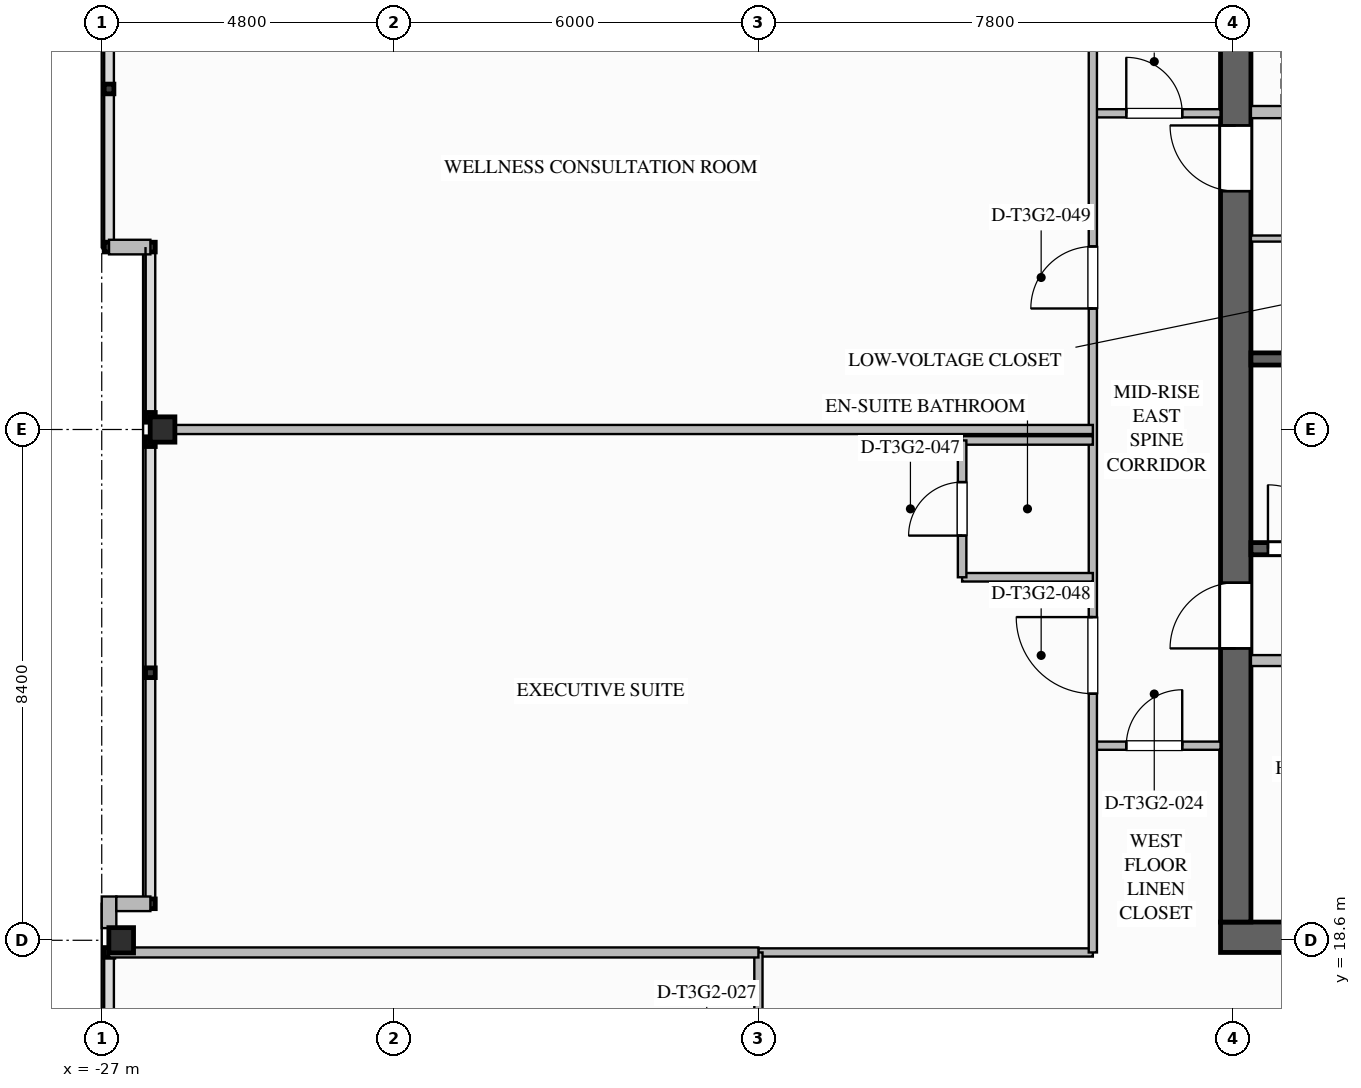
"""IFC4 building model, lengths in metres.
Left out: names, types, materials, properties, quantities, classifications, styles, units other than length and angle.
Written with IfcOpenShell. Run it as: python <this file> out.ifc"""

import sys

from ifc_helpers import new_model, si_unit, direction, frame, frame_2d, origin, origin_2d, place, context, subcontext, project, spatial, rectangle, i_section, extrude, element, fill, save


model = new_model("IFC4")
c1 = context("Model", 3, precision=1e-05, world=origin(), true_north=direction((0.0, 1.0)))
c2 = subcontext(c1, "Body", "Model", "MODEL_VIEW")
j1 = project(units=[si_unit("LENGTHUNIT", "METRE"), si_unit("PLANEANGLEUNIT", "RADIAN")], contexts=[c1])
p1 = place(None, origin())
s1 = spatial("IfcSite", under=j1, at=p1, CompositionType="ELEMENT")
p2 = place(p1, origin())
s2 = spatial("IfcBuilding", under=s1, at=p2, CompositionType="ELEMENT")
p3 = place(p2, frame((0.0, 0.0, 161.05)))
s3 = spatial("IfcBuildingStorey", under=s2, at=p3, CompositionType="ELEMENT", Elevation=161.05)
p4 = place(p3, frame((8.6, 18.65, 0.0), z_axis=(0.0, 0.0, 1.0), x_axis=(-1.0, 0.0, 0.0)))
e1 = element("IfcWall", 1, at=p4, inside=s3, PredefinedType="SHEAR", context=c2, shape_type="SweptSolid", body=[
    extrude(rectangle(XDim=17.2, YDim=0.5, at=frame_2d((8.6, 0.0))), origin(), (0.0, 0.0, 1.0), 3.55),
])
p5 = place(p3, frame((-8.35, 18.9, 0.0), z_axis=(0.0, 0.0, 1.0), x_axis=(0.0, 1.0, 0.0)))
e2 = element("IfcWall", 2, at=p5, inside=s3, PredefinedType="SHEAR", context=c2, shape_type="SweptSolid", body=[
    extrude(rectangle(XDim=16.2, YDim=0.5, at=frame_2d((8.1, 0.0))), origin(), (0.0, 0.0, 1.0), 3.55),
])
p6 = place(p5, frame((12.02, 0.0, 0.0)))
e3 = element("IfcOpeningElement", 3, at=p6, cuts=e2, PredefinedType="OPENING", context=c2, shape_type="SweptSolid", body=[
    extrude(rectangle(XDim=1.08, YDim=2.04, at=frame_2d((0.54, 1.02))), frame((0.0, 0.26, 0.0), z_axis=(0.0, -1.0, 0.0), x_axis=(1.0, 0.0, 0.0)), (0.0, 0.0, 1.0), 0.52),
])
p7 = place(p5, frame((4.5, 0.0, 0.0)))
e4 = element("IfcOpeningElement", 4, at=p7, cuts=e2, PredefinedType="OPENING", context=c2, shape_type="SweptSolid", body=[
    extrude(rectangle(XDim=1.08, YDim=2.04, at=frame_2d((0.54, 1.02))), frame((0.0, 0.26, 0.0), z_axis=(0.0, -1.0, 0.0), x_axis=(1.0, 0.0, 0.0)), (0.0, 0.0, 1.0), 0.52),
])
for number, where, z_axis, x_axis in (
    (5, (-26.68, 18.6, 0.0), (0.0, 0.0, 1.0), (1.0, 0.0, 0.0)),
    (6, (-26.0, 27.0, 0.0), (0.0, 0.0, 1.0), (1.0, 0.0, 0.0)),
):
    element("IfcColumn", number, at=place(p3, frame(where, z_axis=z_axis, x_axis=x_axis)), inside=s3, PredefinedType="COLUMN", context=c2, shape_type="SweptSolid", body=[
        extrude(i_section(OverallWidth=0.406, OverallDepth=0.416, WebThickness=0.03, FlangeThickness=0.048, FilletRadius=0.028, at=origin_2d()), origin(), (0.0, 0.0, 1.0), 3.547),
    ])
p8 = place(p3, frame((-26.88, 18.8, 0.0), z_axis=(0.0, 0.0, 1.0), x_axis=(0.0, 1.0, 0.0)))
e7 = element("IfcWall", 7, at=p8, inside=s3, PredefinedType="STANDARD", context=c2, shape_type="SweptSolid", body=[
    extrude(rectangle(XDim=0.52, YDim=0.24, at=frame_2d((0.26, 0.0))), origin(), (0.0, 0.0, 1.0), 3.29),
])
p9 = place(p3, frame((-26.76, 19.2, 0.0), z_axis=(0.0, 0.0, 1.0), x_axis=(1.0, 0.0, 0.0)))
e8 = element("IfcWall", 8, at=p9, inside=s3, PredefinedType="STANDARD", context=c2, shape_type="SweptSolid", body=[
    extrude(rectangle(XDim=0.56, YDim=0.24, at=frame_2d((0.28, 0.0))), origin(), (0.0, 0.0, 1.0), 3.29),
])
p10 = place(p3, frame((-26.2, 30.0, 0.0), z_axis=(0.0, 0.0, 1.0), x_axis=(-1.0, 0.0, 0.0)))
e9 = element("IfcWall", 9, at=p10, inside=s3, PredefinedType="STANDARD", context=c2, shape_type="SweptSolid", body=[
    extrude(rectangle(XDim=0.68, YDim=0.24, at=frame_2d((0.34, 0.0))), origin(), (0.0, 0.0, 1.0), 3.29),
])
p11 = place(p3, frame((-8.1, 25.04, 0.0), z_axis=(0.0, 0.0, 1.0), x_axis=(1.0, 0.0, 0.0)))
e10 = element("IfcWall", 10, at=p11, inside=s3, PredefinedType="SOLIDWALL", context=c2, shape_type="SweptSolid", body=[
    extrude(rectangle(XDim=8.1, YDim=0.2, at=frame_2d((4.05, 0.0))), origin(), (0.0, 0.0, 1.0), 3.29),
])
p12 = place(p11, frame((0.28, 0.0, 0.0)))
e11 = element("IfcOpeningElement", 11, at=p12, cuts=e10, PredefinedType="OPENING", context=c2, shape_type="SweptSolid", body=[
    extrude(rectangle(XDim=1.05, YDim=2.1, at=frame_2d((0.525, 1.05))), frame((0.0, 0.11, 0.0), z_axis=(0.0, -1.0, 0.0), x_axis=(1.0, 0.0, 0.0)), (0.0, 0.0, 1.0), 0.22),
])
p13 = place(p3, frame((-8.1, 28.16, 0.0), z_axis=(0.0, 0.0, 1.0), x_axis=(1.0, 0.0, 0.0)))
e12 = element("IfcWall", 12, at=p13, inside=s3, PredefinedType="SOLIDWALL", context=c2, shape_type="SweptSolid", body=[
    extrude(rectangle(XDim=8.1, YDim=0.2, at=frame_2d((4.05, 0.0))), origin(), (0.0, 0.0, 1.0), 3.29),
])
p14 = place(p3, frame((-8.1, 32.22, 0.0), z_axis=(0.0, 0.0, 1.0), x_axis=(1.0, 0.0, 0.0)))
e13 = element("IfcWall", 13, at=p14, inside=s3, PredefinedType="SOLIDWALL", context=c2, shape_type="SweptSolid", body=[
    extrude(rectangle(XDim=7.1, YDim=0.2, at=frame_2d((3.55, 0.0))), origin(), (0.0, 0.0, 1.0), 3.29),
])
p15 = place(p14, frame((0.95, 0.0, 0.0)))
e14 = element("IfcOpeningElement", 14, at=p15, cuts=e13, PredefinedType="OPENING", context=c2, shape_type="SweptSolid", body=[
    extrude(rectangle(XDim=1.1, YDim=2.2, at=frame_2d((0.55, 1.1))), frame((0.0, 0.11, 0.0), z_axis=(0.0, -1.0, 0.0), x_axis=(1.0, 0.0, 0.0)), (0.0, 0.0, 1.0), 0.22),
])
p16 = place(p14, frame((3.27, 0.0, 0.0)))
e15 = element("IfcOpeningElement", 15, at=p16, cuts=e13, PredefinedType="OPENING", context=c2, shape_type="SweptSolid", body=[
    extrude(rectangle(XDim=1.1, YDim=2.2, at=frame_2d((0.55, 1.1))), frame((0.0, 0.11, 0.0), z_axis=(0.0, -1.0, 0.0), x_axis=(1.0, 0.0, 0.0)), (0.0, 0.0, 1.0), 0.22),
])
p17 = place(p14, frame((5.59, 0.0, 0.0)))
e16 = element("IfcOpeningElement", 16, at=p17, cuts=e13, PredefinedType="OPENING", context=c2, shape_type="SweptSolid", body=[
    extrude(rectangle(XDim=1.1, YDim=2.2, at=frame_2d((0.55, 1.1))), frame((0.0, 0.11, 0.0), z_axis=(0.0, -1.0, 0.0), x_axis=(1.0, 0.0, 0.0)), (0.0, 0.0, 1.0), 0.22),
])
p18 = place(p3, frame((-8.1, 30.14, 0.0), z_axis=(0.0, 0.0, 1.0), x_axis=(1.0, 0.0, 0.0)))
e17 = element("IfcWall", 17, at=p18, inside=s3, PredefinedType="PARTITIONING", context=c2, shape_type="SweptSolid", body=[
    extrude(rectangle(XDim=7.1, YDim=0.1, at=frame_2d((3.55, 0.0))), origin(), (0.0, 0.0, 1.0), 3.29),
])
p19 = place(p18, frame((0.55, 0.0, 0.0)))
e18 = element("IfcOpeningElement", 18, at=p19, cuts=e17, PredefinedType="OPENING", context=c2, shape_type="SweptSolid", body=[
    extrude(rectangle(XDim=0.88, YDim=2.1, at=frame_2d((0.44, 1.05))), frame((0.0, 0.06, 0.0), z_axis=(0.0, -1.0, 0.0), x_axis=(1.0, 0.0, 0.0)), (0.0, 0.0, 1.0), 0.12),
])
p20 = place(p18, frame((3.6, 0.0, 0.0)))
e19 = element("IfcOpeningElement", 19, at=p20, cuts=e17, PredefinedType="OPENING", context=c2, shape_type="SweptSolid", body=[
    extrude(rectangle(XDim=0.92, YDim=2.1, at=frame_2d((0.46, 1.05))), frame((0.0, 0.06, 0.0), z_axis=(0.0, -1.0, 0.0), x_axis=(1.0, 0.0, 0.0)), (0.0, 0.0, 1.0), 0.12),
])
p21 = place(p3, frame((-8.1, 23.2, 0.0), z_axis=(0.0, 0.0, 1.0), x_axis=(1.0, 0.0, 0.0)))
e20 = element("IfcWall", 20, at=p21, inside=s3, PredefinedType="SOLIDWALL", context=c2, shape_type="SweptSolid", body=[
    extrude(rectangle(XDim=8.65, YDim=0.18, at=frame_2d((4.325, 0.0))), origin(), (0.0, 0.0, 1.0), 3.29),
])
p22 = place(p21, frame((1.0, 0.0, 0.0)))
e21 = element("IfcOpeningElement", 21, at=p22, cuts=e20, PredefinedType="OPENING", context=c2, shape_type="SweptSolid", body=[
    extrude(rectangle(XDim=1.0, YDim=2.1, at=frame_2d((0.5, 1.05))), frame((0.0, 0.1, 0.0), z_axis=(0.0, -1.0, 0.0), x_axis=(1.0, 0.0, 0.0)), (0.0, 0.0, 1.0), 0.2),
])
p23 = place(p21, frame((4.0, 0.0, 0.0)))
e22 = element("IfcOpeningElement", 22, at=p23, cuts=e20, PredefinedType="OPENING", context=c2, shape_type="SweptSolid", body=[
    extrude(rectangle(XDim=1.0, YDim=2.1, at=frame_2d((0.5, 1.05))), frame((0.0, 0.1, 0.0), z_axis=(0.0, -1.0, 0.0), x_axis=(1.0, 0.0, 0.0)), (0.0, 0.0, 1.0), 0.2),
])
p24 = place(p21, frame((6.8, 0.0, 0.0)))
e23 = element("IfcOpeningElement", 23, at=p24, cuts=e20, PredefinedType="OPENING", context=c2, shape_type="SweptSolid", body=[
    extrude(rectangle(XDim=1.0, YDim=2.1, at=frame_2d((0.5, 1.05))), frame((0.0, 0.1, 0.0), z_axis=(0.0, -1.0, 0.0), x_axis=(1.0, 0.0, 0.0)), (0.0, 0.0, 1.0), 0.2),
])
p25 = place(p3, frame((-10.7, 21.8, 0.0), z_axis=(0.0, 0.0, 1.0), x_axis=(1.0, 0.0, 0.0)))
e24 = element("IfcWall", 24, at=p25, inside=s3, PredefinedType="PARTITIONING", context=c2, shape_type="SweptSolid", body=[
    extrude(rectangle(XDim=2.1, YDim=0.135, at=frame_2d((1.05, 0.0))), origin(), (0.0, 0.0, 1.0), 3.29),
])
p26 = place(p25, frame((0.55, 0.0, 0.0)))
e25 = element("IfcOpeningElement", 25, at=p26, cuts=e24, PredefinedType="OPENING", context=c2, shape_type="SweptSolid", body=[
    extrude(rectangle(XDim=0.92, YDim=2.1, at=frame_2d((0.46, 1.05))), frame((0.0, 0.077, 0.0), z_axis=(0.0, -1.0, 0.0), x_axis=(1.0, 0.0, 0.0)), (0.0, 0.0, 1.0), 0.155),
])
p27 = place(p3, frame((-10.7, 32.2, 0.0), z_axis=(0.0, 0.0, 1.0), x_axis=(1.0, 0.0, 0.0)))
e26 = element("IfcWall", 26, at=p27, inside=s3, PredefinedType="PARTITIONING", context=c2, shape_type="SweptSolid", body=[
    extrude(rectangle(XDim=2.1, YDim=0.135, at=frame_2d((1.05, 0.0))), origin(), (0.0, 0.0, 1.0), 3.29),
])
p28 = place(p27, frame((0.55, 0.0, 0.0)))
e27 = element("IfcOpeningElement", 27, at=p28, cuts=e26, PredefinedType="OPENING", context=c2, shape_type="SweptSolid", body=[
    extrude(rectangle(XDim=0.92, YDim=2.1, at=frame_2d((0.46, 1.05))), frame((0.0, 0.077, 0.0), z_axis=(0.0, -1.0, 0.0), x_axis=(1.0, 0.0, 0.0)), (0.0, 0.0, 1.0), 0.155),
])
p29 = place(p3, frame((-16.2, 18.4, 0.0), z_axis=(0.0, 0.0, 1.0), x_axis=(1.0, 0.0, 0.0)))
e28 = element("IfcWall", 28, at=p29, inside=s3, PredefinedType="PARTITIONING", context=c2, shape_type="SweptSolid", body=[
    extrude(rectangle(XDim=5.5, YDim=0.135, at=frame_2d((2.75, 0.0))), origin(), (0.0, 0.0, 1.0), 2.667),
])
p30 = place(p3, frame((-10.7, 18.4, 0.0), z_axis=(0.0, 0.0, 1.0), x_axis=(0.0, 1.0, 0.0)))
e29 = element("IfcWall", 29, at=p30, inside=s3, PredefinedType="PARTITIONING", context=c2, shape_type="SweptSolid", body=[
    extrude(rectangle(XDim=17.2, YDim=0.135, at=frame_2d((8.6, 0.0))), origin(), (0.0, 0.0, 1.0), 3.29),
])
p31 = place(p30, frame((4.255, 0.0, 0.0)))
e30 = element("IfcOpeningElement", 30, at=p31, cuts=e29, PredefinedType="OPENING", context=c2, shape_type="SweptSolid", body=[
    extrude(rectangle(XDim=1.26, YDim=2.2, at=frame_2d((0.63, 1.1))), frame((0.0, 0.077, 0.0), z_axis=(0.0, -1.0, 0.0), x_axis=(1.0, 0.0, 0.0)), (0.0, 0.0, 1.0), 0.155),
])
p32 = place(p30, frame((10.59, 0.0, 0.0)))
e31 = element("IfcOpeningElement", 31, at=p32, cuts=e29, PredefinedType="OPENING", context=c2, shape_type="SweptSolid", body=[
    extrude(rectangle(XDim=1.02, YDim=2.15, at=frame_2d((0.51, 1.075))), frame((0.0, 0.077, 0.0), z_axis=(0.0, -1.0, 0.0), x_axis=(1.0, 0.0, 0.0)), (0.0, 0.0, 1.0), 0.155),
])
p33 = place(p3, frame((-16.2, 15.7, 0.0), z_axis=(0.0, 0.0, 1.0), x_axis=(0.0, 1.0, 0.0)))
e32 = element("IfcWall", 32, at=p33, inside=s3, PredefinedType="PARTITIONING", context=c2, shape_type="SweptSolid", body=[
    extrude(rectangle(XDim=2.7, YDim=0.135, at=frame_2d((1.35, 0.0))), origin(), (0.0, 0.0, 1.0), 2.58),
])
p34 = place(p33, frame((0.52, 0.0, 0.0)))
e33 = element("IfcOpeningElement", 33, at=p34, cuts=e32, PredefinedType="OPENING", context=c2, shape_type="SweptSolid", body=[
    extrude(rectangle(XDim=1.02, YDim=2.15, at=frame_2d((0.51, 1.075))), frame((0.0, 0.077, 0.0), z_axis=(0.0, -1.0, 0.0), x_axis=(1.0, 0.0, 0.0)), (0.0, 0.0, 1.0), 0.155),
])
p35 = place(p3, frame((-26.88, 18.4, 0.0), z_axis=(0.0, 0.0, 1.0), x_axis=(1.0, 0.0, 0.0)))
e34 = element("IfcWall", 34, at=p35, inside=s3, PredefinedType="PARTITIONING", context=c2, shape_type="SweptSolid", body=[
    extrude(rectangle(XDim=10.68, YDim=0.165, at=frame_2d((5.34, 0.0))), origin(), (0.0, 0.0, 1.0), 2.58),
])
p36 = place(p3, frame((-26.2, 27.0, 0.0), z_axis=(0.0, 0.0, 1.0), x_axis=(1.0, 0.0, 0.0)))
e35 = element("IfcWall", 35, at=p36, inside=s3, PredefinedType="PARTITIONING", context=c2, shape_type="SweptSolid", body=[
    extrude(rectangle(XDim=15.5, YDim=0.15, at=frame_2d((7.75, 0.0))), origin(), (0.0, 0.0, 1.0), 2.58),
])
p37 = place(p3, frame((-10.7, 24.57, 0.0), z_axis=(0.0, 0.0, 1.0), x_axis=(-1.0, 0.0, 0.0)))
e36 = element("IfcWall", 36, at=p37, inside=s3, PredefinedType="PLUMBINGWALL", context=c2, shape_type="SweptSolid", body=[
    extrude(rectangle(XDim=2.15, YDim=0.14, at=frame_2d((1.075, 0.0))), origin(), (0.0, 0.0, 1.0), 3.29),
])
p38 = place(p3, frame((-10.7, 26.82, 0.0), z_axis=(0.0, 0.0, 1.0), x_axis=(-1.0, 0.0, 0.0)))
e37 = element("IfcWall", 37, at=p38, inside=s3, PredefinedType="PLUMBINGWALL", context=c2, shape_type="SweptSolid", body=[
    extrude(rectangle(XDim=2.15, YDim=0.14, at=frame_2d((1.075, 0.0))), origin(), (0.0, 0.0, 1.0), 2.667),
])
p39 = place(p3, frame((-12.85, 24.57, 0.0), z_axis=(0.0, 0.0, 1.0), x_axis=(0.0, 1.0, 0.0)))
e38 = element("IfcWall", 38, at=p39, inside=s3, PredefinedType="PLUMBINGWALL", context=c2, shape_type="SweptSolid", body=[
    extrude(rectangle(XDim=2.25, YDim=0.14, at=frame_2d((1.125, 0.0))), origin(), (0.0, 0.0, 1.0), 3.29),
])
p40 = place(p39, frame((0.685, 0.0, 0.0)))
e39 = element("IfcOpeningElement", 39, at=p40, cuts=e38, PredefinedType="OPENING", context=c2, shape_type="SweptSolid", body=[
    extrude(rectangle(XDim=0.88, YDim=2.1, at=frame_2d((0.44, 1.05))), frame((0.0, 0.08, 0.0), z_axis=(0.0, -1.0, 0.0), x_axis=(1.0, 0.0, 0.0)), (0.0, 0.0, 1.0), 0.16),
])
p41 = place(p12, origin())
e40 = element("IfcDoor", 40, at=p41, inside=s3, OperationType="SINGLE_SWING_LEFT", PredefinedType="DOOR", context=c2, shape_type="SweptSolid", body=[
    extrude(rectangle(XDim=1.05, YDim=2.1, at=frame_2d((0.525, 1.05))), frame((0.0, 0.025, 0.0), z_axis=(0.0, -1.0, 0.0), x_axis=(1.0, 0.0, 0.0)), (0.0, 0.0, 1.0), 0.05),
])
fill(e11, e40)
p42 = place(p6, origin())
e41 = element("IfcDoor", 41, at=p42, inside=s3, OperationType="SINGLE_SWING_RIGHT", PredefinedType="DOOR", context=c2, shape_type="SweptSolid", body=[
    extrude(rectangle(XDim=1.08, YDim=2.04, at=frame_2d((0.54, 1.02))), frame((0.0, 0.025, 0.0), z_axis=(0.0, -1.0, 0.0), x_axis=(1.0, 0.0, 0.0)), (0.0, 0.0, 1.0), 0.05),
])
fill(e3, e41)
p43 = place(p7, origin())
e42 = element("IfcDoor", 42, at=p43, inside=s3, OperationType="SINGLE_SWING_LEFT", PredefinedType="DOOR", context=c2, shape_type="SweptSolid", body=[
    extrude(rectangle(XDim=1.08, YDim=2.04, at=frame_2d((0.54, 1.02))), frame((0.0, 0.025, 0.0), z_axis=(0.0, -1.0, 0.0), x_axis=(1.0, 0.0, 0.0)), (0.0, 0.0, 1.0), 0.05),
])
fill(e4, e42)
p44 = place(p26, origin())
e43 = element("IfcDoor", 43, at=p44, inside=s3, OperationType="SINGLE_SWING_RIGHT", PredefinedType="DOOR", context=c2, shape_type="SweptSolid", body=[
    extrude(rectangle(XDim=0.92, YDim=2.1, at=frame_2d((0.46, 1.05))), frame((0.0, 0.025, 0.0), z_axis=(0.0, -1.0, 0.0), x_axis=(1.0, 0.0, 0.0)), (0.0, 0.0, 1.0), 0.05),
])
fill(e25, e43)
p45 = place(p28, origin())
e44 = element("IfcDoor", 44, at=p45, inside=s3, OperationType="SINGLE_SWING_LEFT", PredefinedType="DOOR", context=c2, shape_type="SweptSolid", body=[
    extrude(rectangle(XDim=0.92, YDim=2.1, at=frame_2d((0.46, 1.05))), frame((0.0, 0.025, 0.0), z_axis=(0.0, -1.0, 0.0), x_axis=(1.0, 0.0, 0.0)), (0.0, 0.0, 1.0), 0.05),
])
fill(e27, e44)
p46 = place(p40, origin())
e45 = element("IfcDoor", 45, at=p46, inside=s3, OperationType="SINGLE_SWING_LEFT", PredefinedType="DOOR", context=c2, shape_type="SweptSolid", body=[
    extrude(rectangle(XDim=0.88, YDim=2.1, at=frame_2d((0.44, 1.05))), frame((0.0, 0.025, 0.0), z_axis=(0.0, -1.0, 0.0), x_axis=(1.0, 0.0, 0.0)), (0.0, 0.0, 1.0), 0.05),
])
fill(e39, e45)
p47 = place(p31, origin())
e46 = element("IfcDoor", 46, at=p47, inside=s3, OperationType="SINGLE_SWING_RIGHT", PredefinedType="DOOR", context=c2, shape_type="SweptSolid", body=[
    extrude(rectangle(XDim=1.26, YDim=2.2, at=frame_2d((0.63, 1.1))), frame((0.0, 0.025, 0.0), z_axis=(0.0, -1.0, 0.0), x_axis=(1.0, 0.0, 0.0)), (0.0, 0.0, 1.0), 0.05),
])
fill(e30, e46)
p48 = place(p32, origin())
e47 = element("IfcDoor", 47, at=p48, inside=s3, OperationType="SINGLE_SWING_LEFT", PredefinedType="DOOR", context=c2, shape_type="SweptSolid", body=[
    extrude(rectangle(XDim=1.02, YDim=2.15, at=frame_2d((0.51, 1.075))), frame((0.0, 0.025, 0.0), z_axis=(0.0, -1.0, 0.0), x_axis=(1.0, 0.0, 0.0)), (0.0, 0.0, 1.0), 0.05),
])
fill(e31, e47)
save(model, sys.argv[1])
